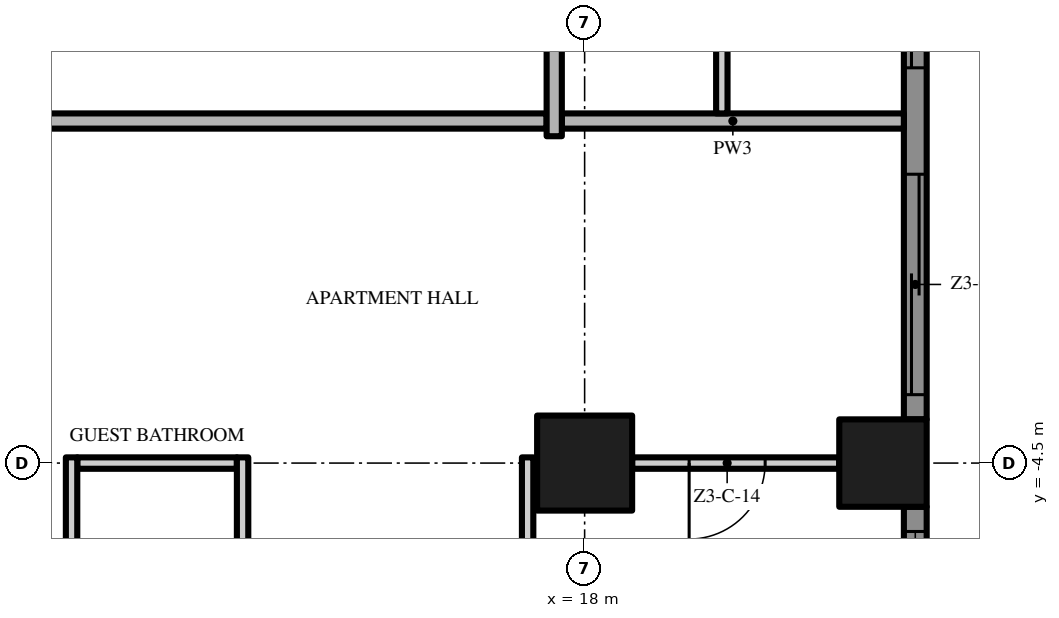
"""IFC4 building model, lengths in metres.
Left out: names, types, materials, properties, quantities, classifications, styles, units other than length and angle.
Written with IfcOpenShell. Run it as: python <this file> out.ifc"""

import sys

from ifc_helpers import new_model, si_unit, direction, frame, frame_2d, origin, origin_2d, place, context, subcontext, project, spatial, polyline, rectangle, outline, extrude, element, fill, save


model = new_model("IFC4")
c1 = context("Model", 3, precision=1e-05, world=origin(), true_north=direction((0.0, 1.0)))
c2 = subcontext(c1, "Body", "Model", "MODEL_VIEW")
j1 = project(units=[si_unit("LENGTHUNIT", "METRE"), si_unit("PLANEANGLEUNIT", "RADIAN")], contexts=[c1])
p1 = place(None, origin())
s1 = spatial("IfcSite", under=j1, at=p1, CompositionType="ELEMENT")
p2 = place(p1, origin())
s2 = spatial("IfcBuilding", under=s1, at=p2, CompositionType="ELEMENT")
p3 = place(p2, frame((0.0, 0.0, 155.4)))
s3 = spatial("IfcBuildingStorey", under=s2, at=p3, CompositionType="ELEMENT", Elevation=155.4)
p4 = place(p3, frame((18.0, -4.5, 0.0), z_axis=(0.0, 0.0, 1.0), x_axis=(1.0, 0.0, 0.0)))
e1 = element("IfcColumn", 1, at=p4, inside=s3, PredefinedType="COLUMN", context=c2, shape_type="SweptSolid", body=[
    extrude(rectangle(XDim=1.25, YDim=1.25, at=origin_2d()), origin(), (0.0, 0.0, 1.0), 3.5),
])
p5 = place(p3, frame((21.925, -4.5, 0.0), z_axis=(0.0, 0.0, 1.0), x_axis=(1.0, 0.0, 0.0)))
e2 = element("IfcColumn", 2, at=p5, inside=s3, PredefinedType="COLUMN", context=c2, shape_type="SweptSolid", body=[
    extrude(rectangle(XDim=1.15, YDim=1.15, at=origin_2d()), origin(), (0.0, 0.0, 1.0), 3.5),
])
p6 = place(p3, frame((22.35, -5.075, 0.0), z_axis=(0.0, 0.0, 1.0), x_axis=(0.0, -1.0, 0.0)))
e3 = element("IfcWall", 3, at=p6, inside=s3, PredefinedType="SOLIDWALL", context=c2, shape_type="SweptSolid", body=[
    extrude(rectangle(XDim=7.275, YDim=0.3, at=frame_2d((3.638, 0.0))), origin(), (0.0, 0.0, 1.0), 3.5),
])
p7 = place(p6, frame((4.625, 0.0, 0.45)))
e4 = element("IfcOpeningElement", 4, at=p7, cuts=e3, PredefinedType="OPENING", context=c2, shape_type="SweptSolid", body=[
    extrude(rectangle(XDim=2.35, YDim=2.65, at=frame_2d((1.175, 1.325))), frame((0.0, 0.16, 0.0), z_axis=(0.0, -1.0, 0.0), x_axis=(1.0, 0.0, 0.0)), (0.0, 0.0, 1.0), 0.32),
])
p8 = place(p6, frame((0.325, 0.0, 0.45)))
e5 = element("IfcOpeningElement", 5, at=p8, cuts=e3, PredefinedType="OPENING", context=c2, shape_type="SweptSolid", body=[
    extrude(rectangle(XDim=2.9, YDim=2.65, at=frame_2d((1.45, 1.325))), frame((0.0, 0.16, 0.0), z_axis=(0.0, -1.0, 0.0), x_axis=(1.0, 0.0, 0.0)), (0.0, 0.0, 1.0), 0.32),
])
p9 = place(p3, frame((22.35, 3.925, 0.0), z_axis=(0.0, 0.0, 1.0), x_axis=(0.0, -1.0, 0.0)))
e6 = element("IfcWall", 6, at=p9, inside=s3, PredefinedType="SOLIDWALL", context=c2, shape_type="SweptSolid", body=[
    extrude(rectangle(XDim=7.85, YDim=0.3, at=frame_2d((3.925, 0.0))), origin(), (0.0, 0.0, 1.0), 3.5),
])
p10 = place(p9, frame((4.625, 0.0, 0.0)))
e7 = element("IfcOpeningElement", 7, at=p10, cuts=e6, PredefinedType="OPENING", context=c2, shape_type="SweptSolid", body=[
    extrude(rectangle(XDim=2.9, YDim=2.4, at=frame_2d((1.45, 1.2))), frame((0.0, 0.16, 0.0), z_axis=(0.0, -1.0, 0.0), x_axis=(1.0, 0.0, 0.0)), (0.0, 0.0, 1.0), 0.32),
])
p11 = place(p9, frame((0.325, 0.0, 0.0)))
e8 = element("IfcOpeningElement", 8, at=p11, cuts=e6, PredefinedType="OPENING", context=c2, shape_type="SweptSolid", body=[
    extrude(rectangle(XDim=2.9, YDim=2.4, at=frame_2d((1.45, 1.2))), frame((0.0, 0.16, 0.0), z_axis=(0.0, -1.0, 0.0), x_axis=(1.0, 0.0, 0.0)), (0.0, 0.0, 1.0), 0.32),
])
p12 = place(p3, origin())
e9 = element("IfcWall", 9, at=p12, inside=s3, PredefinedType="USERDEFINED", context=c2, shape_type="SweptSolid", body=[
    extrude(outline(polyline([(25.149, -13.5), (24.488, -12.0), (23.755, -10.5), (23.231, -9.0), (23.1, -7.875), (23.115, -7.5), (23.451, -6.0), (24.112, -4.5), (24.845, -3.0), (25.369, -1.5), (25.5, -0.375), (25.485, 0.0), (25.149, 1.5), (24.488, 3.0), (23.755, 4.5), (23.231, 6.0), (23.1, 7.125), (23.115, 7.5), (23.451, 9.0), (24.112, 10.5), (24.845, 12.0), (25.369, 13.5), (25.5, 14.625), (25.485, 15.0), (25.149, 16.5), (24.488, 18.0), (24.259, 17.899), (24.91, 16.421), (25.236, 14.967), (25.249, 14.635), (25.124, 13.556), (24.614, 12.096), (23.885, 10.605), (23.213, 9.079), (22.866, 7.533), (22.849, 7.115), (22.986, 5.944), (23.524, 4.404), (24.261, 2.895), (24.91, 1.421), (25.236, -0.033), (25.249, -0.365), (25.124, -1.444), (24.614, -2.904), (23.885, -4.395), (23.213, -5.921), (22.866, -7.467), (22.849, -7.885), (22.986, -9.056), (23.524, -10.596), (24.261, -12.105), (24.92, -13.601), (25.149, -13.5)])), origin(), (0.0, 0.0, 1.0), 0.9),
])
p13 = place(p3, frame((11.325, -4.5, 0.0), z_axis=(0.0, 0.0, 1.0), x_axis=(1.0, 0.0, 0.0)))
e10 = element("IfcWall", 10, at=p13, inside=s3, PredefinedType="PARTITIONING", context=c2, shape_type="SweptSolid", body=[
    extrude(rectangle(XDim=2.1, YDim=0.15, at=frame_2d((1.05, 0.0))), origin(), (0.0, 0.0, 1.0), 3.5),
])
p14 = place(p3, frame((21.35, -4.5, 0.0), z_axis=(0.0, 0.0, 1.0), x_axis=(-1.0, 0.0, 0.0)))
e11 = element("IfcWall", 11, at=p14, inside=s3, PredefinedType="PARTITIONING", context=c2, shape_type="SweptSolid", body=[
    extrude(rectangle(XDim=2.725, YDim=0.15, at=frame_2d((1.363, 0.0))), origin(), (0.0, 0.0, 1.0), 3.5),
])
p15 = place(p14, frame((0.975, 0.0, 0.0)))
e12 = element("IfcOpeningElement", 12, at=p15, cuts=e11, PredefinedType="OPENING", context=c2, shape_type="SweptSolid", body=[
    extrude(rectangle(XDim=1.0, YDim=2.4, at=frame_2d((0.5, 1.2))), frame((0.0, 0.085, 0.0), z_axis=(0.0, -1.0, 0.0), x_axis=(1.0, 0.0, 0.0)), (0.0, 0.0, 1.0), 0.17),
])
p16 = place(p3, frame((17.5, 0.0, 0.0), z_axis=(0.0, 0.0, 1.0), x_axis=(-1.0, 0.0, 0.0)))
e13 = element("IfcWall", 13, at=p16, inside=s3, PredefinedType="PARTITIONING", context=c2, shape_type="SweptSolid", body=[
    extrude(rectangle(XDim=35.0, YDim=0.2, at=frame_2d((17.5, 0.0))), origin(), (0.0, 0.0, 1.0), 3.5),
])
p17 = place(p16, frame((16.75, 0.0, 0.0)))
e14 = element("IfcOpeningElement", 14, at=p17, cuts=e13, PredefinedType="OPENING", context=c2, shape_type="SweptSolid", body=[
    extrude(rectangle(XDim=1.5, YDim=2.4, at=frame_2d((0.75, 1.2))), frame((0.0, 0.11, 0.0), z_axis=(0.0, -1.0, 0.0), x_axis=(1.0, 0.0, 0.0)), (0.0, 0.0, 1.0), 0.22),
])
p18 = place(p3, frame((17.7, 0.0, 0.0), z_axis=(0.0, 0.0, 1.0), x_axis=(1.0, 0.0, 0.0)))
e15 = element("IfcWall", 15, at=p18, inside=s3, PredefinedType="PARTITIONING", context=c2, shape_type="SweptSolid", body=[
    extrude(rectangle(XDim=4.5, YDim=0.2, at=frame_2d((2.25, 0.0))), origin(), (0.0, 0.0, 1.0), 3.5),
])
p19 = place(p3, frame((11.25, -12.075, 0.0), z_axis=(0.0, 0.0, 1.0), x_axis=(0.0, 1.0, 0.0)))
e16 = element("IfcWall", 16, at=p19, inside=s3, PredefinedType="PARTITIONING", context=c2, shape_type="SweptSolid", body=[
    extrude(rectangle(XDim=7.65, YDim=0.15, at=frame_2d((3.825, 0.0))), origin(), (0.0, 0.0, 1.0), 3.5),
])
p20 = place(p3, frame((13.5, -17.7, 0.0), z_axis=(0.0, 0.0, 1.0), x_axis=(0.0, 1.0, 0.0)))
e17 = element("IfcWall", 17, at=p20, inside=s3, PredefinedType="PARTITIONING", context=c2, shape_type="SweptSolid", body=[
    extrude(rectangle(XDim=13.275, YDim=0.15, at=frame_2d((6.638, 0.0))), origin(), (0.0, 0.0, 1.0), 3.5),
])
p21 = place(p20, frame((10.5, 0.0, 0.0)))
e18 = element("IfcOpeningElement", 18, at=p21, cuts=e17, PredefinedType="OPENING", context=c2, shape_type="SweptSolid", body=[
    extrude(rectangle(XDim=0.9, YDim=2.1, at=frame_2d((0.45, 1.05))), frame((0.0, 0.085, 0.0), z_axis=(0.0, -1.0, 0.0), x_axis=(1.0, 0.0, 0.0)), (0.0, 0.0, 1.0), 0.17),
])
p22 = place(p3, frame((17.25, -8.925, 0.0), z_axis=(0.0, 0.0, 1.0), x_axis=(0.0, 1.0, 0.0)))
e19 = element("IfcWall", 19, at=p22, inside=s3, PredefinedType="PARTITIONING", context=c2, shape_type="SweptSolid", body=[
    extrude(rectangle(XDim=4.5, YDim=0.15, at=frame_2d((2.25, 0.0))), origin(), (0.0, 0.0, 1.0), 3.5),
])
p23 = place(p3, frame((17.6, -0.2, 0.0), z_axis=(0.0, 0.0, 1.0), x_axis=(0.0, 1.0, 0.0)))
e20 = element("IfcWall", 20, at=p23, inside=s3, PredefinedType="PARTITIONING", context=c2, shape_type="SweptSolid", body=[
    extrude(rectangle(XDim=4.075, YDim=0.2, at=frame_2d((2.038, 0.0))), origin(), (0.0, 0.0, 1.0), 3.5),
])
p24 = place(p3, frame((19.805, 0.1, 0.0), z_axis=(0.0, 0.0, 1.0), x_axis=(0.0, 1.0, 0.0)))
e21 = element("IfcWall", 21, at=p24, inside=s3, PredefinedType="PARTITIONING", context=c2, shape_type="SweptSolid", body=[
    extrude(rectangle(XDim=2.225, YDim=0.15, at=frame_2d((1.113, 0.0))), origin(), (0.0, 0.0, 1.0), 3.5),
])
p25 = place(p8, origin())
e22 = element("IfcWindow", 22, at=p25, inside=s3, PartitioningType="SINGLE_PANEL", PredefinedType="WINDOW", context=c2, shape_type="SweptSolid", body=[
    extrude(rectangle(XDim=2.9, YDim=2.65, at=frame_2d((1.45, 1.325))), frame((0.0, 0.03, 0.0), z_axis=(0.0, -1.0, 0.0), x_axis=(1.0, 0.0, 0.0)), (0.0, 0.0, 1.0), 0.06),
])
fill(e5, e22)
p26 = place(p10, origin())
e23 = element("IfcDoor", 23, at=p26, inside=s3, OperationType="SINGLE_SWING_LEFT", PredefinedType="DOOR", context=c2, shape_type="SweptSolid", body=[
    extrude(rectangle(XDim=2.9, YDim=2.4, at=frame_2d((1.45, 1.2))), frame((0.0, 0.025, 0.0), z_axis=(0.0, -1.0, 0.0), x_axis=(1.0, 0.0, 0.0)), (0.0, 0.0, 1.0), 0.05),
])
fill(e7, e23)
p27 = place(p11, origin())
e24 = element("IfcDoor", 24, at=p27, inside=s3, OperationType="SINGLE_SWING_LEFT", PredefinedType="DOOR", context=c2, shape_type="SweptSolid", body=[
    extrude(rectangle(XDim=2.9, YDim=2.4, at=frame_2d((1.45, 1.2))), frame((0.0, 0.025, 0.0), z_axis=(0.0, -1.0, 0.0), x_axis=(1.0, 0.0, 0.0)), (0.0, 0.0, 1.0), 0.05),
])
fill(e8, e24)
p28 = place(p15, origin())
e25 = element("IfcDoor", 25, at=p28, inside=s3, OperationType="SINGLE_SWING_RIGHT", PredefinedType="DOOR", context=c2, shape_type="SweptSolid", body=[
    extrude(rectangle(XDim=1.0, YDim=2.4, at=frame_2d((0.5, 1.2))), frame((0.0, 0.025, 0.0), z_axis=(0.0, -1.0, 0.0), x_axis=(1.0, 0.0, 0.0)), (0.0, 0.0, 1.0), 0.05),
])
fill(e12, e25)
save(model, sys.argv[1])
